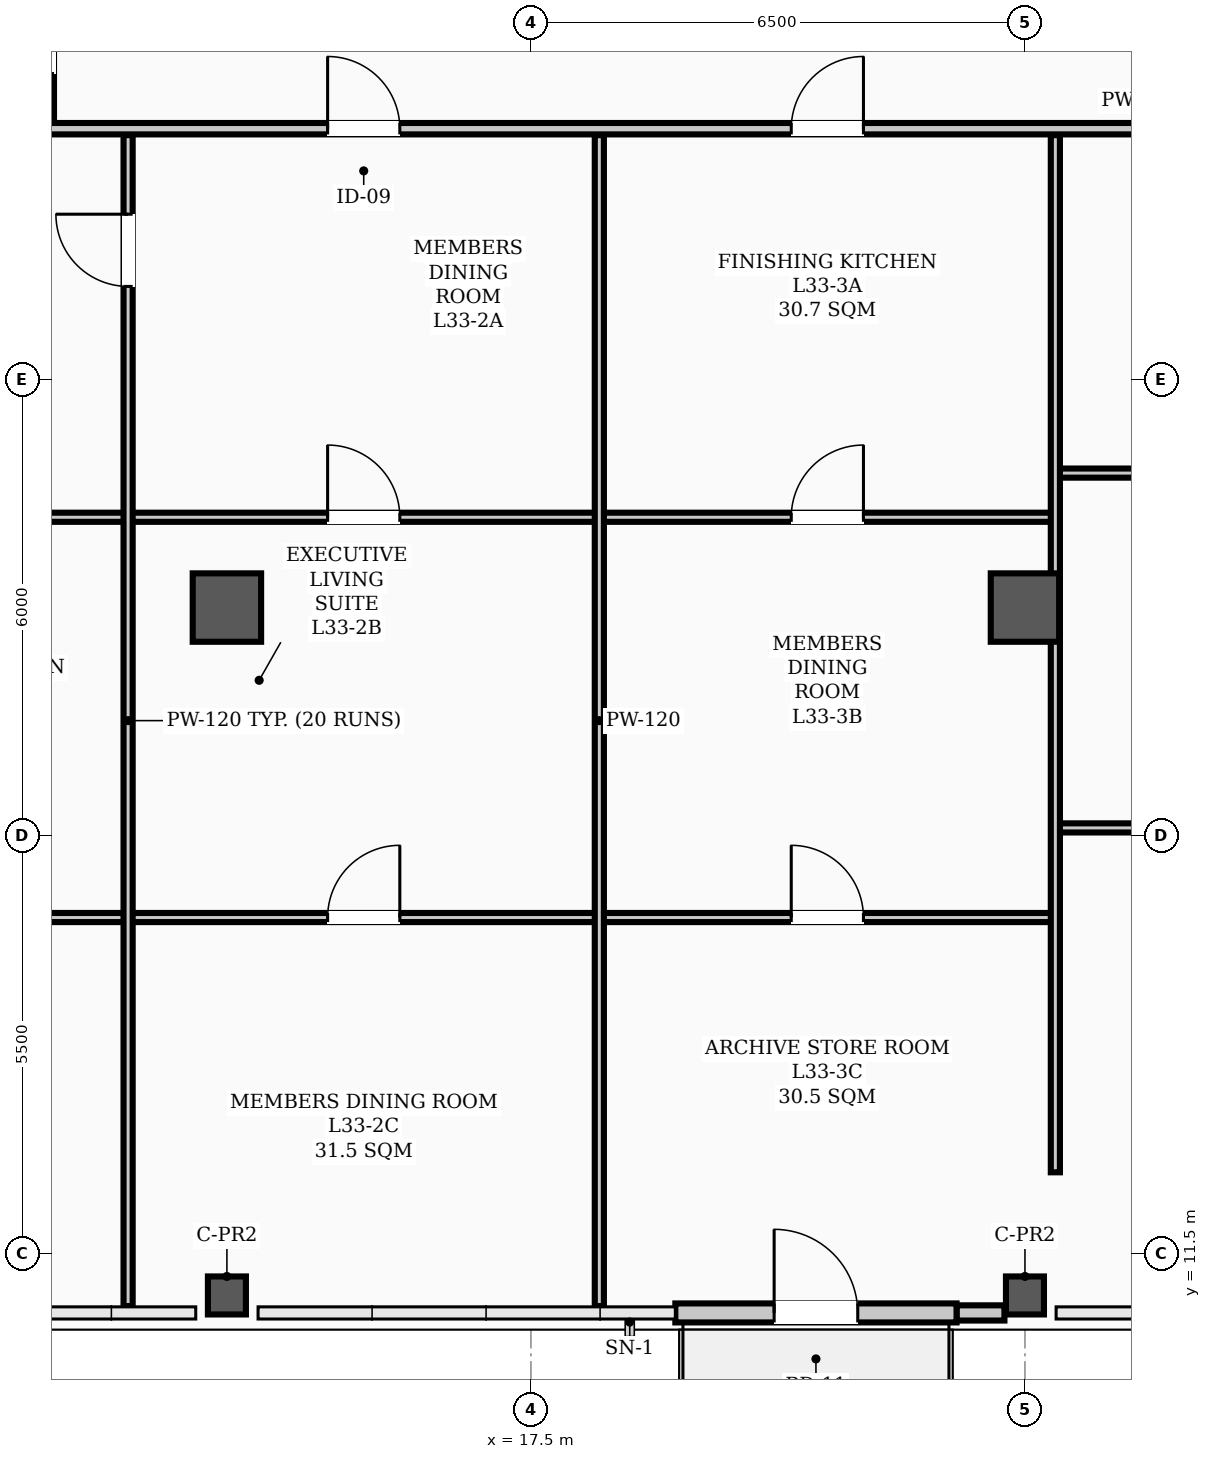
"""IFC4 building model, lengths in metres.
Left out: names, types, materials, properties, quantities, classifications, styles, units other than length and angle.
Written with IfcOpenShell. Run it as: python <this file> out.ifc"""

import sys

from ifc_helpers import new_model, si_unit, direction, frame, frame_2d, origin, origin_2d, place, context, subcontext, project, spatial, rectangle, hollow_rectangle, extrude, element, fill, save


model = new_model("IFC4")
c1 = context("Model", 3, precision=1e-05, world=origin(), true_north=direction((0.0, 1.0)))
c2 = subcontext(c1, "Body", "Model", "MODEL_VIEW")
j1 = project(units=[si_unit("LENGTHUNIT", "METRE"), si_unit("PLANEANGLEUNIT", "RADIAN")], contexts=[c1])
p1 = place(None, origin())
s1 = spatial("IfcSite", under=j1, at=p1, CompositionType="ELEMENT")
p2 = place(p1, origin())
s2 = spatial("IfcBuilding", under=s1, at=p2, CompositionType="ELEMENT")
p3 = place(p2, frame((0.0, 0.0, 134.4)))
s3 = spatial("IfcBuildingStorey", under=s2, at=p3, CompositionType="ELEMENT", Elevation=134.4)
for number, where, z_axis, x_axis in (
    (1, (13.5, 20.0, 0.0), (0.0, 0.0, 1.0), (1.0, 0.0, 0.0)),
    (2, (24.0, 20.0, 0.0), (0.0, 0.0, 1.0), (1.0, 0.0, 0.0)),
):
    element("IfcColumn", number, at=place(p3, frame(where, z_axis=z_axis, x_axis=x_axis)), inside=s3, PredefinedType="COLUMN", context=c2, shape_type="SweptSolid", body=[
        extrude(hollow_rectangle(XDim=0.9, YDim=0.9, WallThickness=0.035, InnerFilletRadius=0.017, OuterFilletRadius=0.052, at=origin_2d()), origin(), (0.0, 0.0, 1.0), 3.9),
    ])
for number, where, z_axis, x_axis in (
    (3, (13.5, 10.95, 0.0), (0.0, 0.0, 1.0), (1.0, 0.0, 0.0)),
    (4, (24.0, 10.95, 0.0), (0.0, 0.0, 1.0), (1.0, 0.0, 0.0)),
):
    element("IfcColumn", number, at=place(p3, frame(where, z_axis=z_axis, x_axis=x_axis)), inside=s3, PredefinedType="COLUMN", context=c2, shape_type="SweptSolid", body=[
        extrude(hollow_rectangle(XDim=0.5, YDim=0.5, WallThickness=0.024, InnerFilletRadius=0.012, OuterFilletRadius=0.036, at=origin_2d()), origin(), (0.0, 0.0, 1.0), 3.9),
    ])
p4 = place(p3, frame((23.1, 10.72, 0.0), z_axis=(0.0, 0.0, 1.0), x_axis=(1.0, 0.0, 0.0)))
e5 = element("IfcWall", 5, at=p4, inside=s3, PredefinedType="PARAPET", context=c2, shape_type="SweptSolid", body=[
    extrude(rectangle(XDim=0.63, YDim=0.2, at=frame_2d((0.315, 0.0))), origin(), (0.0, 0.0, 1.0), 1.2),
])
p5 = place(p3, frame((19.4, 10.72, 0.0), z_axis=(0.0, 0.0, 1.0), x_axis=(1.0, 0.0, 0.0)))
e6 = element("IfcWall", 6, at=p5, inside=s3, PredefinedType="STANDARD", context=c2, shape_type="SweptSolid", body=[
    extrude(rectangle(XDim=3.7, YDim=0.25, at=frame_2d((1.85, 0.0))), origin(), (0.0, 0.0, 1.0), 3.18),
])
p6 = place(p5, frame((1.3, 0.0, 0.0)))
e7 = element("IfcOpeningElement", 7, at=p6, cuts=e6, PredefinedType="OPENING", context=c2, shape_type="SweptSolid", body=[
    extrude(rectangle(XDim=1.1, YDim=2.2, at=frame_2d((0.55, 1.1))), frame((0.0, 0.135, 0.0), z_axis=(0.0, -1.0, 0.0), x_axis=(1.0, 0.0, 0.0)), (0.0, 0.0, 1.0), 0.27),
])
p7 = place(p3, frame((2.31, 26.3, 0.0), z_axis=(0.0, 0.0, 1.0), x_axis=(1.0, 0.0, 0.0)))
e8 = element("IfcWall", 8, at=p7, inside=s3, PredefinedType="PARTITIONING", context=c2, shape_type="SweptSolid", body=[
    extrude(rectangle(XDim=46.38, YDim=0.15, at=frame_2d((23.19, 0.0))), origin(), (0.0, 0.0, 1.0), 3.1),
])
p8 = place(p7, frame((12.515, 0.0, 0.0)))
e9 = element("IfcOpeningElement", 9, at=p8, cuts=e8, PredefinedType="OPENING", context=c2, shape_type="SweptSolid", body=[
    extrude(rectangle(XDim=0.95, YDim=2.08, at=frame_2d((0.475, 1.04))), frame((0.0, 0.085, 0.0), z_axis=(0.0, -1.0, 0.0), x_axis=(1.0, 0.0, 0.0)), (0.0, 0.0, 1.0), 0.17),
])
p9 = place(p7, frame((18.615, 0.0, 0.0)))
e10 = element("IfcOpeningElement", 10, at=p9, cuts=e8, PredefinedType="OPENING", context=c2, shape_type="SweptSolid", body=[
    extrude(rectangle(XDim=0.95, YDim=2.08, at=frame_2d((0.475, 1.04))), frame((0.0, 0.085, 0.0), z_axis=(0.0, -1.0, 0.0), x_axis=(1.0, 0.0, 0.0)), (0.0, 0.0, 1.0), 0.17),
])
p10 = place(p7, frame((26.115, 0.0, 0.0)))
e11 = element("IfcOpeningElement", 11, at=p10, cuts=e8, PredefinedType="OPENING", context=c2, shape_type="SweptSolid", body=[
    extrude(rectangle(XDim=0.95, YDim=2.08, at=frame_2d((0.475, 1.04))), frame((0.0, 0.085, 0.0), z_axis=(0.0, -1.0, 0.0), x_axis=(1.0, 0.0, 0.0)), (0.0, 0.0, 1.0), 0.17),
])
p11 = place(p7, frame((31.665, 0.0, 0.0)))
e12 = element("IfcOpeningElement", 12, at=p11, cuts=e8, PredefinedType="OPENING", context=c2, shape_type="SweptSolid", body=[
    extrude(rectangle(XDim=0.95, YDim=2.08, at=frame_2d((0.475, 1.04))), frame((0.0, 0.085, 0.0), z_axis=(0.0, -1.0, 0.0), x_axis=(1.0, 0.0, 0.0)), (0.0, 0.0, 1.0), 0.17),
])
p12 = place(p7, frame((43.06, 0.0, 0.0)))
e13 = element("IfcOpeningElement", 13, at=p12, cuts=e8, PredefinedType="OPENING", context=c2, shape_type="SweptSolid", body=[
    extrude(rectangle(XDim=0.95, YDim=2.08, at=frame_2d((0.475, 1.04))), frame((0.0, 0.085, 0.0), z_axis=(0.0, -1.0, 0.0), x_axis=(1.0, 0.0, 0.0)), (0.0, 0.0, 1.0), 0.17),
])
p13 = place(p3, frame((2.31, 21.188, 0.0), z_axis=(0.0, 0.0, 1.0), x_axis=(1.0, 0.0, 0.0)))
e14 = element("IfcWall", 14, at=p13, inside=s3, PredefinedType="PARTITIONING", context=c2, shape_type="SweptSolid", body=[
    extrude(rectangle(XDim=9.89, YDim=0.12, at=frame_2d((4.945, 0.0))), origin(), (0.0, 0.0, 1.0), 3.212),
])
p14 = place(p13, frame((4.47, 0.0, 0.0)))
e15 = element("IfcOpeningElement", 15, at=p14, cuts=e14, PredefinedType="OPENING", context=c2, shape_type="SweptSolid", body=[
    extrude(rectangle(XDim=0.95, YDim=2.08, at=frame_2d((0.475, 1.04))), frame((0.0, 0.07, 0.0), z_axis=(0.0, -1.0, 0.0), x_axis=(1.0, 0.0, 0.0)), (0.0, 0.0, 1.0), 0.14),
])
p15 = place(p3, frame((2.31, 15.922, 0.0), z_axis=(0.0, 0.0, 1.0), x_axis=(1.0, 0.0, 0.0)))
e16 = element("IfcWall", 16, at=p15, inside=s3, PredefinedType="PARTITIONING", context=c2, shape_type="SweptSolid", body=[
    extrude(rectangle(XDim=9.89, YDim=0.12, at=frame_2d((4.945, 0.0))), origin(), (0.0, 0.0, 1.0), 3.72),
])
p16 = place(p15, frame((4.47, 0.0, 0.0)))
e17 = element("IfcOpeningElement", 17, at=p16, cuts=e16, PredefinedType="OPENING", context=c2, shape_type="SweptSolid", body=[
    extrude(rectangle(XDim=0.95, YDim=2.08, at=frame_2d((0.475, 1.04))), frame((0.0, 0.07, 0.0), z_axis=(0.0, -1.0, 0.0), x_axis=(1.0, 0.0, 0.0)), (0.0, 0.0, 1.0), 0.14),
])
p17 = place(p3, frame((12.2, 21.188, 0.0), z_axis=(0.0, 0.0, 1.0), x_axis=(1.0, 0.0, 0.0)))
e18 = element("IfcWall", 18, at=p17, inside=s3, PredefinedType="PARTITIONING", context=c2, shape_type="SweptSolid", body=[
    extrude(rectangle(XDim=6.2, YDim=0.12, at=frame_2d((3.1, 0.0))), origin(), (0.0, 0.0, 1.0), 3.1),
])
p18 = place(p17, frame((2.625, 0.0, 0.0)))
e19 = element("IfcOpeningElement", 19, at=p18, cuts=e18, PredefinedType="OPENING", context=c2, shape_type="SweptSolid", body=[
    extrude(rectangle(XDim=0.95, YDim=2.08, at=frame_2d((0.475, 1.04))), frame((0.0, 0.07, 0.0), z_axis=(0.0, -1.0, 0.0), x_axis=(1.0, 0.0, 0.0)), (0.0, 0.0, 1.0), 0.14),
])
p19 = place(p3, frame((12.2, 15.922, 0.0), z_axis=(0.0, 0.0, 1.0), x_axis=(1.0, 0.0, 0.0)))
e20 = element("IfcWall", 20, at=p19, inside=s3, PredefinedType="PARTITIONING", context=c2, shape_type="SweptSolid", body=[
    extrude(rectangle(XDim=6.2, YDim=0.12, at=frame_2d((3.1, 0.0))), origin(), (0.0, 0.0, 1.0), 3.1),
])
p20 = place(p19, frame((2.625, 0.0, 0.0)))
e21 = element("IfcOpeningElement", 21, at=p20, cuts=e20, PredefinedType="OPENING", context=c2, shape_type="SweptSolid", body=[
    extrude(rectangle(XDim=0.95, YDim=2.08, at=frame_2d((0.475, 1.04))), frame((0.0, 0.07, 0.0), z_axis=(0.0, -1.0, 0.0), x_axis=(1.0, 0.0, 0.0)), (0.0, 0.0, 1.0), 0.14),
])
p21 = place(p3, frame((18.4, 21.188, 0.0), z_axis=(0.0, 0.0, 1.0), x_axis=(1.0, 0.0, 0.0)))
e22 = element("IfcWall", 22, at=p21, inside=s3, PredefinedType="PARTITIONING", context=c2, shape_type="SweptSolid", body=[
    extrude(rectangle(XDim=6.0, YDim=0.12, at=frame_2d((3.0, 0.0))), origin(), (0.0, 0.0, 1.0), 3.1),
])
p22 = place(p21, frame((2.525, 0.0, 0.0)))
e23 = element("IfcOpeningElement", 23, at=p22, cuts=e22, PredefinedType="OPENING", context=c2, shape_type="SweptSolid", body=[
    extrude(rectangle(XDim=0.95, YDim=2.08, at=frame_2d((0.475, 1.04))), frame((0.0, 0.07, 0.0), z_axis=(0.0, -1.0, 0.0), x_axis=(1.0, 0.0, 0.0)), (0.0, 0.0, 1.0), 0.14),
])
p23 = place(p3, frame((18.4, 15.922, 0.0), z_axis=(0.0, 0.0, 1.0), x_axis=(1.0, 0.0, 0.0)))
e24 = element("IfcWall", 24, at=p23, inside=s3, PredefinedType="PARTITIONING", context=c2, shape_type="SweptSolid", body=[
    extrude(rectangle(XDim=6.0, YDim=0.12, at=frame_2d((3.0, 0.0))), origin(), (0.0, 0.0, 1.0), 3.1),
])
p24 = place(p23, frame((2.525, 0.0, 0.0)))
e25 = element("IfcOpeningElement", 25, at=p24, cuts=e24, PredefinedType="OPENING", context=c2, shape_type="SweptSolid", body=[
    extrude(rectangle(XDim=0.95, YDim=2.08, at=frame_2d((0.475, 1.04))), frame((0.0, 0.07, 0.0), z_axis=(0.0, -1.0, 0.0), x_axis=(1.0, 0.0, 0.0)), (0.0, 0.0, 1.0), 0.14),
])
p25 = place(p3, frame((24.4, 21.769, 0.0), z_axis=(0.0, 0.0, 1.0), x_axis=(1.0, 0.0, 0.0)))
e26 = element("IfcWall", 26, at=p25, inside=s3, PredefinedType="PARTITIONING", context=c2, shape_type="SweptSolid", body=[
    extrude(rectangle(XDim=9.0, YDim=0.12, at=frame_2d((4.5, 0.0))), origin(), (0.0, 0.0, 1.0), 3.1),
])
p26 = place(p25, frame((4.025, 0.0, 0.0)))
e27 = element("IfcOpeningElement", 27, at=p26, cuts=e26, PredefinedType="OPENING", context=c2, shape_type="SweptSolid", body=[
    extrude(rectangle(XDim=0.95, YDim=2.08, at=frame_2d((0.475, 1.04))), frame((0.0, 0.07, 0.0), z_axis=(0.0, -1.0, 0.0), x_axis=(1.0, 0.0, 0.0)), (0.0, 0.0, 1.0), 0.14),
])
p27 = place(p3, frame((24.4, 17.101, 0.0), z_axis=(0.0, 0.0, 1.0), x_axis=(1.0, 0.0, 0.0)))
e28 = element("IfcWall", 28, at=p27, inside=s3, PredefinedType="PARTITIONING", context=c2, shape_type="SweptSolid", body=[
    extrude(rectangle(XDim=9.0, YDim=0.12, at=frame_2d((4.5, 0.0))), origin(), (0.0, 0.0, 1.0), 3.1),
])
p28 = place(p27, frame((4.025, 0.0, 0.0)))
e29 = element("IfcOpeningElement", 29, at=p28, cuts=e28, PredefinedType="OPENING", context=c2, shape_type="SweptSolid", body=[
    extrude(rectangle(XDim=0.95, YDim=2.08, at=frame_2d((0.475, 1.04))), frame((0.0, 0.07, 0.0), z_axis=(0.0, -1.0, 0.0), x_axis=(1.0, 0.0, 0.0)), (0.0, 0.0, 1.0), 0.14),
])
p29 = place(p3, frame((11.15, 26.385, 0.0), z_axis=(0.0, 0.0, 1.0), x_axis=(0.0, 1.0, 0.0)))
e30 = element("IfcWall", 30, at=p29, inside=s3, PredefinedType="PARTITIONING", context=c2, shape_type="SweptSolid", body=[
    extrude(rectangle(XDim=11.28, YDim=0.15, at=frame_2d((5.64, 0.0))), origin(), (0.0, 0.0, 1.0), 3.0),
])
p30 = place(p29, frame((0.64, 0.0, 0.0)))
e31 = element("IfcOpeningElement", 31, at=p30, cuts=e30, PredefinedType="OPENING", context=c2, shape_type="SweptSolid", body=[
    extrude(rectangle(XDim=0.95, YDim=2.08, at=frame_2d((0.475, 1.04))), frame((0.0, 0.085, 0.0), z_axis=(0.0, -1.0, 0.0), x_axis=(1.0, 0.0, 0.0)), (0.0, 0.0, 1.0), 0.17),
])
p31 = place(p29, frame((8.765, 0.0, 0.0)))
e32 = element("IfcOpeningElement", 32, at=p31, cuts=e30, PredefinedType="OPENING", context=c2, shape_type="SweptSolid", body=[
    extrude(rectangle(XDim=0.95, YDim=2.08, at=frame_2d((0.475, 1.04))), frame((0.0, 0.085, 0.0), z_axis=(0.0, -1.0, 0.0), x_axis=(1.0, 0.0, 0.0)), (0.0, 0.0, 1.0), 0.17),
])
p32 = place(p3, frame((12.2, 10.81, 0.0), z_axis=(0.0, 0.0, 1.0), x_axis=(0.0, 1.0, 0.0)))
e33 = element("IfcWall", 33, at=p32, inside=s3, PredefinedType="PARTITIONING", context=c2, shape_type="SweptSolid", body=[
    extrude(rectangle(XDim=15.405, YDim=0.12, at=frame_2d((7.703, 0.0))), origin(), (0.0, 0.0, 1.0), 3.0),
])
p33 = place(p32, frame((13.415, 0.0, 0.0)))
e34 = element("IfcOpeningElement", 34, at=p33, cuts=e33, PredefinedType="OPENING", context=c2, shape_type="SweptSolid", body=[
    extrude(rectangle(XDim=0.95, YDim=2.08, at=frame_2d((0.475, 1.04))), frame((0.0, 0.07, 0.0), z_axis=(0.0, -1.0, 0.0), x_axis=(1.0, 0.0, 0.0)), (0.0, 0.0, 1.0), 0.14),
])
p34 = place(p3, frame((18.4, 10.81, 0.0), z_axis=(0.0, 0.0, 1.0), x_axis=(0.0, 1.0, 0.0)))
e35 = element("IfcWall", 35, at=p34, inside=s3, PredefinedType="PARTITIONING", context=c2, shape_type="SweptSolid", body=[
    extrude(rectangle(XDim=15.405, YDim=0.12, at=frame_2d((7.703, 0.0))), origin(), (0.0, 0.0, 1.0), 3.0),
])
p35 = place(p3, frame((24.4, 12.57, 0.0), z_axis=(0.0, 0.0, 1.0), x_axis=(0.0, 1.0, 0.0)))
e36 = element("IfcWall", 36, at=p35, inside=s3, PredefinedType="PARTITIONING", context=c2, shape_type="SweptSolid", body=[
    extrude(rectangle(XDim=13.645, YDim=0.12, at=frame_2d((6.823, 0.0))), origin(), (0.0, 0.0, 1.0), 3.0),
])
p36 = place(p6, origin())
e37 = element("IfcDoor", 37, at=p36, inside=s3, OperationType="SINGLE_SWING_LEFT", PredefinedType="DOOR", context=c2, shape_type="SweptSolid", body=[
    extrude(rectangle(XDim=1.1, YDim=2.2, at=frame_2d((0.55, 1.1))), frame((0.0, 0.025, 0.0), z_axis=(0.0, -1.0, 0.0), x_axis=(1.0, 0.0, 0.0)), (0.0, 0.0, 1.0), 0.05),
])
fill(e7, e37)
p37 = place(p33, origin())
e38 = element("IfcDoor", 38, at=p37, inside=s3, OperationType="SINGLE_SWING_RIGHT", PredefinedType="DOOR", context=c2, shape_type="SweptSolid", body=[
    extrude(rectangle(XDim=0.95, YDim=2.08, at=frame_2d((0.475, 1.04))), frame((0.0, 0.025, 0.0), z_axis=(0.0, -1.0, 0.0), x_axis=(1.0, 0.0, 0.0)), (0.0, 0.0, 1.0), 0.05),
])
fill(e34, e38)
p38 = place(p18, origin())
e39 = element("IfcDoor", 39, at=p38, inside=s3, OperationType="SINGLE_SWING_LEFT", PredefinedType="DOOR", context=c2, shape_type="SweptSolid", body=[
    extrude(rectangle(XDim=0.95, YDim=2.08, at=frame_2d((0.475, 1.04))), frame((0.0, 0.025, 0.0), z_axis=(0.0, -1.0, 0.0), x_axis=(1.0, 0.0, 0.0)), (0.0, 0.0, 1.0), 0.05),
])
fill(e19, e39)
p39 = place(p20, origin())
e40 = element("IfcDoor", 40, at=p39, inside=s3, OperationType="SINGLE_SWING_RIGHT", PredefinedType="DOOR", context=c2, shape_type="SweptSolid", body=[
    extrude(rectangle(XDim=0.95, YDim=2.08, at=frame_2d((0.475, 1.04))), frame((0.0, 0.025, 0.0), z_axis=(0.0, -1.0, 0.0), x_axis=(1.0, 0.0, 0.0)), (0.0, 0.0, 1.0), 0.05),
])
fill(e21, e40)
p40 = place(p8, origin())
e41 = element("IfcDoor", 41, at=p40, inside=s3, OperationType="SINGLE_SWING_LEFT", PredefinedType="DOOR", context=c2, shape_type="SweptSolid", body=[
    extrude(rectangle(XDim=0.95, YDim=2.08, at=frame_2d((0.475, 1.04))), frame((0.0, 0.025, 0.0), z_axis=(0.0, -1.0, 0.0), x_axis=(1.0, 0.0, 0.0)), (0.0, 0.0, 1.0), 0.05),
])
fill(e9, e41)
p41 = place(p22, origin())
e42 = element("IfcDoor", 42, at=p41, inside=s3, OperationType="SINGLE_SWING_RIGHT", PredefinedType="DOOR", context=c2, shape_type="SweptSolid", body=[
    extrude(rectangle(XDim=0.95, YDim=2.08, at=frame_2d((0.475, 1.04))), frame((0.0, 0.025, 0.0), z_axis=(0.0, -1.0, 0.0), x_axis=(1.0, 0.0, 0.0)), (0.0, 0.0, 1.0), 0.05),
])
fill(e23, e42)
p42 = place(p24, origin())
e43 = element("IfcDoor", 43, at=p42, inside=s3, OperationType="SINGLE_SWING_LEFT", PredefinedType="DOOR", context=c2, shape_type="SweptSolid", body=[
    extrude(rectangle(XDim=0.95, YDim=2.08, at=frame_2d((0.475, 1.04))), frame((0.0, 0.025, 0.0), z_axis=(0.0, -1.0, 0.0), x_axis=(1.0, 0.0, 0.0)), (0.0, 0.0, 1.0), 0.05),
])
fill(e25, e43)
p43 = place(p9, origin())
e44 = element("IfcDoor", 44, at=p43, inside=s3, OperationType="SINGLE_SWING_RIGHT", PredefinedType="DOOR", context=c2, shape_type="SweptSolid", body=[
    extrude(rectangle(XDim=0.95, YDim=2.08, at=frame_2d((0.475, 1.04))), frame((0.0, 0.025, 0.0), z_axis=(0.0, -1.0, 0.0), x_axis=(1.0, 0.0, 0.0)), (0.0, 0.0, 1.0), 0.05),
])
fill(e10, e44)
save(model, sys.argv[1])
